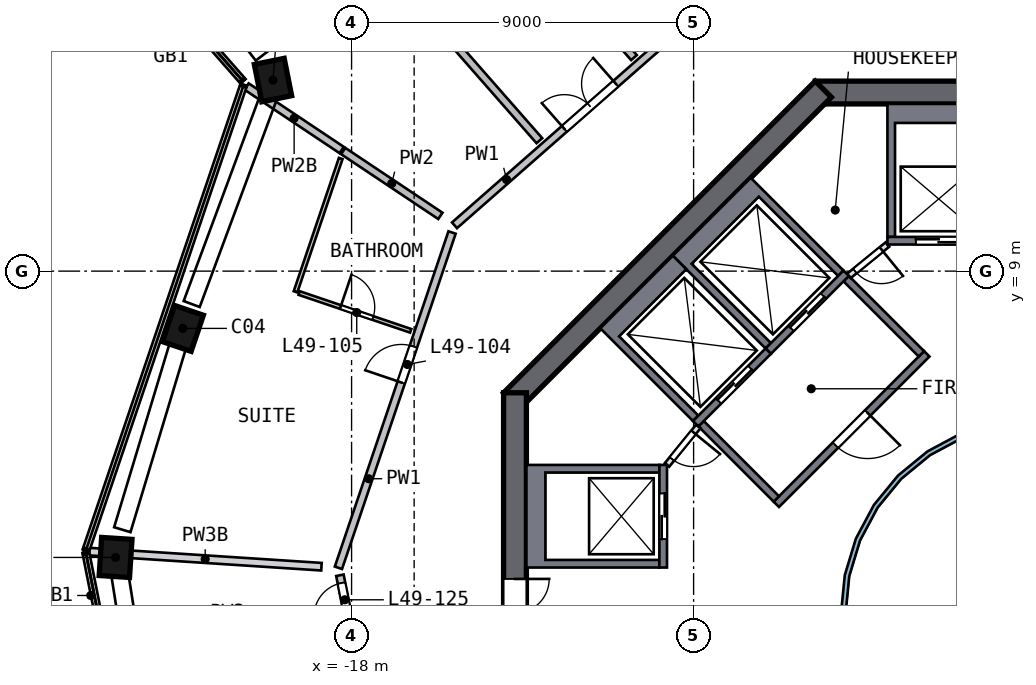
"""IFC4 building model, lengths in metres.
Left out: names, types, materials, properties, quantities, classifications, styles, units other than length and angle.
Written with IfcOpenShell. Run it as: python <this file> out.ifc"""

import sys

from ifc_helpers import new_model, si_unit, direction, frame, frame_2d, origin, origin_2d, place, context, subcontext, project, spatial, polyline, rectangle, outline, extrude, element, fill, save


model = new_model("IFC4")
c1 = context("Model", 3, precision=1e-05, world=origin(), true_north=direction((0.0, 1.0)))
c2 = subcontext(c1, "Body", "Model", "MODEL_VIEW")
j1 = project(units=[si_unit("LENGTHUNIT", "METRE"), si_unit("PLANEANGLEUNIT", "RADIAN")], contexts=[c1])
p1 = place(None, origin())
s1 = spatial("IfcSite", under=j1, at=p1, CompositionType="ELEMENT")
p2 = place(p1, origin())
s2 = spatial("IfcBuilding", under=s1, at=p2, CompositionType="ELEMENT")
p3 = place(p2, frame((0.0, 0.0, 201.0)))
s3 = spatial("IfcBuildingStorey", under=s2, at=p3, CompositionType="ELEMENT", Elevation=201.0)
p4 = place(p3, frame((-20.006, 14.118, 0.0), z_axis=(-0.051702637, -0.07462356, 0.995870555), x_axis=(-0.19950791, 0.977874236, 0.062917184)))
e1 = element("IfcColumn", 1, at=p4, inside=s3, PredefinedType="COLUMN", context=c2, shape_type="SweptSolid", body=[
    extrude(rectangle(XDim=1.0, YDim=0.8, at=origin_2d()), origin(), (0.0, 0.0, 1.0), 4.207),
])
p5 = place(p3, frame((-22.407, 7.593, 0.0), z_axis=(-0.027454561, -0.083350423, 0.996142035), x_axis=(-0.319622961, -0.943472661, -0.0877525)))
e2 = element("IfcColumn", 2, at=p5, inside=s3, PredefinedType="COLUMN", context=c2, shape_type="SweptSolid", body=[
    extrude(rectangle(XDim=1.0, YDim=0.8, at=origin_2d()), origin(), (0.0, 0.0, 1.0), 4.206),
])
p6 = place(p3, frame((-24.204, 1.574, 0.0), z_axis=(-0.005106808, -0.089833403, 0.995943713), x_axis=(0.064922521, 0.993825699, 0.089975257)))
e3 = element("IfcColumn", 3, at=p6, inside=s3, PredefinedType="COLUMN", context=c2, shape_type="SweptSolid", body=[
    extrude(rectangle(XDim=1.0, YDim=0.8, at=origin_2d()), origin(), (0.0, 0.0, 1.0), 4.207),
])
p7 = place(p3, frame((5.799, 13.7, 0.0), z_axis=(0.0, 0.0, 1.0), x_axis=(-1.0, 0.0, 0.0)))
e4 = element("IfcWall", 4, at=p7, inside=s3, PredefinedType="SHEAR", context=c2, shape_type="SweptSolid", body=[
    extrude(rectangle(XDim=11.598, YDim=0.6, at=frame_2d((5.799, 0.0))), origin(), (0.0, 0.0, 1.0), 4.5),
])
p8 = place(p7, frame((4.899, 0.0, 0.0)))
e5 = element("IfcOpeningElement", 5, at=p8, cuts=e4, PredefinedType="OPENING", context=c2, shape_type="SweptSolid", body=[
    extrude(rectangle(XDim=1.8, YDim=2.1, at=frame_2d((0.9, 1.05))), frame((0.0, 0.31, 0.0), z_axis=(0.0, -1.0, 0.0), x_axis=(1.0, 0.0, 0.0)), (0.0, 0.0, 1.0), 0.62),
])
p9 = place(p3, frame((-5.587, 13.788, 0.0), z_axis=(0.0, 0.0, 1.0), x_axis=(-0.707106781, -0.707106781, 0.0)))
e6 = element("IfcWall", 6, at=p9, inside=s3, PredefinedType="SHEAR", context=c2, shape_type="SweptSolid", body=[
    extrude(rectangle(XDim=11.598, YDim=0.6, at=frame_2d((5.799, 0.0))), origin(), (0.0, 0.0, 1.0), 4.5),
])
p10 = place(p3, frame((-13.7, 5.799, 0.0), z_axis=(0.0, 0.0, 1.0), x_axis=(0.0, -1.0, 0.0)))
e7 = element("IfcWall", 7, at=p10, inside=s3, PredefinedType="SHEAR", context=c2, shape_type="SweptSolid", body=[
    extrude(rectangle(XDim=11.598, YDim=0.6, at=frame_2d((5.799, 0.0))), origin(), (0.0, 0.0, 1.0), 4.5),
])
p11 = place(p10, frame((4.899, 0.0, 0.0)))
e8 = element("IfcOpeningElement", 8, at=p11, cuts=e7, PredefinedType="OPENING", context=c2, shape_type="SweptSolid", body=[
    extrude(rectangle(XDim=1.8, YDim=2.1, at=frame_2d((0.9, 1.05))), frame((0.0, 0.31, 0.0), z_axis=(0.0, -1.0, 0.0), x_axis=(1.0, 0.0, 0.0)), (0.0, 0.0, 1.0), 0.62),
])
p12 = place(p3, origin())
e9 = element("IfcWall", 9, at=p12, inside=s3, PredefinedType="SOLIDWALL", context=c2, shape_type="SweptSolid", body=[
    extrude(outline(polyline([(-3.9, 13.4), (-1.2, 13.4), (-1.2, 9.9), (-1.4, 9.9), (-1.4, 12.9), (-3.7, 12.9), (-3.7, 9.9), (-3.9, 9.9), (-3.9, 13.4)])), origin(), (0.0, 0.0, 1.0), 4.19),
])
p13 = place(p3, frame((-1.2, 9.8, 0.0), z_axis=(0.0, 0.0, 1.0), x_axis=(-1.0, 0.0, 0.0)))
e10 = element("IfcWall", 10, at=p13, inside=s3, PredefinedType="SOLIDWALL", context=c2, shape_type="SweptSolid", body=[
    extrude(rectangle(XDim=2.7, YDim=0.2, at=frame_2d((1.35, 0.0))), origin(), (0.0, 0.0, 1.0), 4.19),
])
p14 = place(p13, frame((0.75, 0.0, 0.0)))
e11 = element("IfcOpeningElement", 11, at=p14, cuts=e10, PredefinedType="OPENING", context=c2, shape_type="SweptSolid", body=[
    extrude(rectangle(XDim=1.2, YDim=2.1, at=frame_2d((0.6, 1.05))), frame((0.0, 0.11, 0.0), z_axis=(0.0, -1.0, 0.0), x_axis=(1.0, 0.0, 0.0)), (0.0, 0.0, 1.0), 0.22),
])
p15 = place(p3, origin())
e12 = element("IfcWall", 12, at=p15, inside=s3, PredefinedType="SOLIDWALL", context=c2, shape_type="SweptSolid", body=[
    extrude(outline(polyline([(-13.4, 3.9), (-9.9, 3.9), (-9.9, 3.7), (-12.9, 3.7), (-12.9, 1.4), (-9.9, 1.4), (-9.9, 1.2), (-13.4, 1.2), (-13.4, 3.9)])), origin(), (0.0, 0.0, 1.0), 4.19),
])
p16 = place(p3, frame((-9.8, 1.2, 0.0), z_axis=(0.0, 0.0, 1.0), x_axis=(0.0, 1.0, 0.0)))
e13 = element("IfcWall", 13, at=p16, inside=s3, PredefinedType="SOLIDWALL", context=c2, shape_type="SweptSolid", body=[
    extrude(rectangle(XDim=2.7, YDim=0.2, at=frame_2d((1.35, 0.0))), origin(), (0.0, 0.0, 1.0), 4.19),
])
p17 = place(p16, frame((0.75, 0.0, 0.0)))
e14 = element("IfcOpeningElement", 14, at=p17, cuts=e13, PredefinedType="OPENING", context=c2, shape_type="SweptSolid", body=[
    extrude(rectangle(XDim=1.2, YDim=2.1, at=frame_2d((0.6, 1.05))), frame((0.0, 0.11, 0.0), z_axis=(0.0, -1.0, 0.0), x_axis=(1.0, 0.0, 0.0)), (0.0, 0.0, 1.0), 0.22),
])
p18 = place(p3, origin())
e15 = element("IfcWall", 15, at=p18, inside=s3, PredefinedType="SOLIDWALL", context=c2, shape_type="SweptSolid", body=[
    extrude(outline(polyline([(-9.546, 9.405), (-7.495, 11.455), (-5.056, 9.016), (-5.197, 8.874), (-7.283, 10.96), (-9.051, 9.192), (-6.965, 7.106), (-7.106, 6.965), (-9.546, 9.405)])), origin(), (0.0, 0.0, 1.0), 4.19),
])
p19 = place(p3, frame((-4.985, 8.945, 0.0), z_axis=(0.0, 0.0, 1.0), x_axis=(-0.707106781, -0.707106781, 0.0)))
e16 = element("IfcWall", 16, at=p19, inside=s3, PredefinedType="SOLIDWALL", context=c2, shape_type="SweptSolid", body=[
    extrude(rectangle(XDim=2.9, YDim=0.2, at=frame_2d((1.45, 0.0))), origin(), (0.0, 0.0, 1.0), 4.19),
])
p20 = place(p19, frame((0.85, 0.0, 0.0)))
e17 = element("IfcOpeningElement", 17, at=p20, cuts=e16, PredefinedType="OPENING", context=c2, shape_type="SweptSolid", body=[
    extrude(rectangle(XDim=1.2, YDim=2.1, at=frame_2d((0.6, 1.05))), frame((0.0, 0.11, 0.0), z_axis=(0.0, -1.0, 0.0), x_axis=(1.0, 0.0, 0.0)), (0.0, 0.0, 1.0), 0.22),
])
p21 = place(p3, origin())
e18 = element("IfcWall", 18, at=p21, inside=s3, PredefinedType="SOLIDWALL", context=c2, shape_type="SweptSolid", body=[
    extrude(outline(polyline([(-11.455, 7.495), (-9.546, 9.405), (-9.192, 9.051), (-10.96, 7.283), (-8.874, 5.197), (-9.016, 5.056), (-11.455, 7.495)])), origin(), (0.0, 0.0, 1.0), 4.19),
])
p22 = place(p3, frame((-7.036, 6.894, 0.0), z_axis=(0.0, 0.0, 1.0), x_axis=(-0.707106781, -0.707106781, 0.0)))
e19 = element("IfcWall", 19, at=p22, inside=s3, PredefinedType="SOLIDWALL", context=c2, shape_type="SweptSolid", body=[
    extrude(rectangle(XDim=2.7, YDim=0.2, at=frame_2d((1.35, 0.0))), origin(), (0.0, 0.0, 1.0), 4.19),
])
p23 = place(p22, frame((0.65, 0.0, 0.0)))
e20 = element("IfcOpeningElement", 20, at=p23, cuts=e19, PredefinedType="OPENING", context=c2, shape_type="SweptSolid", body=[
    extrude(rectangle(XDim=1.2, YDim=2.1, at=frame_2d((0.6, 1.05))), frame((0.0, 0.11, 0.0), z_axis=(0.0, -1.0, 0.0), x_axis=(1.0, 0.0, 0.0)), (0.0, 0.0, 1.0), 0.22),
])
p24 = place(p3, frame((-2.864, 6.823, 0.0), z_axis=(0.0, 0.0, 1.0), x_axis=(-0.707106781, -0.707106781, 0.0)))
e21 = element("IfcWall", 21, at=p24, inside=s3, PredefinedType="SOLIDWALL", context=c2, shape_type="SweptSolid", body=[
    extrude(rectangle(XDim=5.6, YDim=0.2, at=frame_2d((2.8, 0.0))), origin(), (0.0, 0.0, 1.0), 4.19),
])
p25 = place(p24, frame((2.2, 0.0, 0.0)))
e22 = element("IfcOpeningElement", 22, at=p25, cuts=e21, PredefinedType="OPENING", context=c2, shape_type="SweptSolid", body=[
    extrude(rectangle(XDim=1.2, YDim=2.1, at=frame_2d((0.6, 1.05))), frame((0.0, 0.11, 0.0), z_axis=(0.0, -1.0, 0.0), x_axis=(1.0, 0.0, 0.0)), (0.0, 0.0, 1.0), 0.22),
])
for number, where, z_axis, x_axis in (
    (23, (-3.005, 6.823, 0.0), (0.0, 0.0, 1.0), (-0.707, 0.707, 0.0)),
    (24, (-6.823, 3.005, 0.0), (0.0, 0.0, 1.0), (-0.707, 0.707, 0.0)),
):
    element("IfcWall", number, at=place(p3, frame(where, z_axis=z_axis, x_axis=x_axis)), inside=s3, PredefinedType="SOLIDWALL", context=c2, shape_type="SweptSolid", body=[
        extrude(rectangle(XDim=2.8, YDim=0.2, at=frame_2d((1.4, 0.0))), origin(), (0.0, 0.0, 1.0), 4.19),
    ])
p26 = place(p3, frame((-3.9, 9.7, 0.0), z_axis=(0.0, 0.0, 1.0), x_axis=(-0.775559878, -0.631274009, 0.0)))
e25 = element("IfcWall", 25, at=p26, inside=s3, PredefinedType="PARTITIONING", context=c2, shape_type="SweptSolid", body=[
    extrude(rectangle(XDim=1.308, YDim=0.15, at=frame_2d((0.654, 0.0))), origin(), (0.0, 0.0, 1.0), 4.19),
])
p27 = place(p26, frame((0.204, 0.0, 0.0)))
e26 = element("IfcOpeningElement", 26, at=p27, cuts=e25, PredefinedType="OPENING", context=c2, shape_type="SweptSolid", body=[
    extrude(rectangle(XDim=0.9, YDim=2.1, at=frame_2d((0.45, 1.05))), frame((0.0, 0.085, 0.0), z_axis=(0.0, -1.0, 0.0), x_axis=(1.0, 0.0, 0.0)), (0.0, 0.0, 1.0), 0.17),
])
p28 = place(p3, frame((-8.874, 4.914, 0.0), z_axis=(0.0, 0.0, 1.0), x_axis=(-0.631274009, -0.775559878, 0.0)))
e27 = element("IfcWall", 27, at=p28, inside=s3, PredefinedType="PARTITIONING", context=c2, shape_type="SweptSolid", body=[
    extrude(rectangle(XDim=1.308, YDim=0.15, at=frame_2d((0.654, 0.0))), origin(), (0.0, 0.0, 1.0), 4.19),
])
p29 = place(p28, frame((0.204, 0.0, 0.0)))
e28 = element("IfcOpeningElement", 28, at=p29, cuts=e27, PredefinedType="OPENING", context=c2, shape_type="SweptSolid", body=[
    extrude(rectangle(XDim=0.9, YDim=2.1, at=frame_2d((0.45, 1.05))), frame((0.0, 0.085, 0.0), z_axis=(0.0, -1.0, 0.0), x_axis=(1.0, 0.0, 0.0)), (0.0, 0.0, 1.0), 0.17),
])
p30 = place(p3, origin())
e29 = element("IfcWall", 29, at=p30, inside=s3, PredefinedType="SOLIDWALL", context=c2, shape_type="SweptSolid", body=[
    extrude(outline(polyline([(5.021, -0.999), (4.73, -1.959), (4.257, -2.844), (3.62, -3.62), (2.844, -4.257), (1.959, -4.73), (0.999, -5.021), (0.0, -5.12), (-0.999, -5.021), (-1.959, -4.73), (-2.844, -4.257), (-3.62, -3.62), (-4.257, -2.844), (-4.73, -1.959), (-5.021, -0.999), (-5.12, 0.0), (-5.021, 0.999), (-4.73, 1.959), (-4.257, 2.844), (-3.62, 3.62), (-2.844, 4.257), (-1.959, 4.73), (-0.999, 5.021), (0.0, 5.12), (0.999, 5.021), (1.959, 4.73), (2.844, 4.257), (3.62, 3.62), (4.257, 2.844), (4.73, 1.959), (5.021, 0.999), (5.12, 0.0), (5.021, -0.999)]), holes=[polyline([(4.904, 0.976), (4.619, 1.913), (4.157, 2.778), (3.535, 3.535), (2.778, 4.157), (1.913, 4.619), (0.976, 4.904), (0.0, 5.0), (-0.976, 4.904), (-1.913, 4.619), (-2.778, 4.157), (-3.535, 3.535), (-4.157, 2.778), (-4.619, 1.913), (-4.904, 0.976), (-5.0, 0.0), (-4.904, -0.976), (-4.619, -1.913), (-4.157, -2.778), (-3.535, -3.535), (-2.778, -4.157), (-1.913, -4.619), (-0.976, -4.904), (0.0, -5.0), (0.976, -4.904), (1.913, -4.619), (2.778, -4.157), (3.535, -3.535), (4.157, -2.778), (4.619, -1.913), (4.904, -0.976), (5.0, 0.0), (4.904, 0.976)])]), origin(), (0.0, 0.0, 1.0), 4.19),
])
p31 = place(p3, frame((-16.524, -7.943, 0.0), z_axis=(0.0, 0.0, 1.0), x_axis=(-0.195611383, 0.980681491, 0.0)))
e30 = element("IfcWall", 30, at=p31, inside=s3, PredefinedType="SOLIDWALL", context=c2, shape_type="SweptSolid", body=[
    extrude(rectangle(XDim=9.116, YDim=0.2, at=frame_2d((4.558, 0.0))), origin(), (0.0, 0.0, 1.0), 4.19),
])
p32 = place(p31, frame((0.2, 0.0, 0.0)))
e31 = element("IfcOpeningElement", 31, at=p32, cuts=e30, PredefinedType="OPENING", context=c2, shape_type="SweptSolid", body=[
    extrude(rectangle(XDim=1.0, YDim=2.1, at=frame_2d((0.5, 1.05))), frame((0.0, 0.11, 0.0), z_axis=(0.0, -1.0, 0.0), x_axis=(1.0, 0.0, 0.0)), (0.0, 0.0, 1.0), 0.22),
])
p33 = place(p31, frame((8.008, 0.0, 0.0)))
e32 = element("IfcOpeningElement", 32, at=p33, cuts=e30, PredefinedType="OPENING", context=c2, shape_type="SweptSolid", body=[
    extrude(rectangle(XDim=0.9, YDim=2.1, at=frame_2d((0.45, 1.05))), frame((0.0, 0.11, 0.0), z_axis=(0.0, -1.0, 0.0), x_axis=(1.0, 0.0, 0.0)), (0.0, 0.0, 1.0), 0.22),
])
p34 = place(p31, frame((5.758, 0.0, 0.0)))
e33 = element("IfcOpeningElement", 33, at=p34, cuts=e30, PredefinedType="OPENING", context=c2, shape_type="SweptSolid", body=[
    extrude(rectangle(XDim=0.9, YDim=2.1, at=frame_2d((0.45, 1.05))), frame((0.0, 0.11, 0.0), z_axis=(0.0, -1.0, 0.0), x_axis=(1.0, 0.0, 0.0)), (0.0, 0.0, 1.0), 0.22),
])
p35 = place(p3, frame((-18.346, 1.193, 0.0), z_axis=(0.0, 0.0, 1.0), x_axis=(0.320932913, 0.94710193, 0.0)))
e34 = element("IfcWall", 34, at=p35, inside=s3, PredefinedType="SOLIDWALL", context=c2, shape_type="SweptSolid", body=[
    extrude(rectangle(XDim=9.317, YDim=0.2, at=frame_2d((4.658, 0.0))), origin(), (0.0, 0.0, 1.0), 4.19),
])
p36 = place(p35, frame((5.15, 0.0, 0.0)))
e35 = element("IfcOpeningElement", 35, at=p36, cuts=e34, PredefinedType="OPENING", context=c2, shape_type="SweptSolid", body=[
    extrude(rectangle(XDim=1.0, YDim=2.1, at=frame_2d((0.5, 1.05))), frame((0.0, 0.11, 0.0), z_axis=(0.0, -1.0, 0.0), x_axis=(1.0, 0.0, 0.0)), (0.0, 0.0, 1.0), 0.22),
])
p37 = place(p3, frame((-15.292, 10.206, 0.0), z_axis=(0.0, 0.0, 1.0), x_axis=(0.751501064, 0.659731878, 0.0)))
e36 = element("IfcWall", 36, at=p37, inside=s3, PredefinedType="SOLIDWALL", context=c2, shape_type="SweptSolid", body=[
    extrude(rectangle(XDim=9.317, YDim=0.2, at=frame_2d((4.658, 0.0))), origin(), (0.0, 0.0, 1.0), 4.19),
])
p38 = place(p37, frame((3.847, 0.0, 0.0)))
e37 = element("IfcOpeningElement", 37, at=p38, cuts=e36, PredefinedType="OPENING", context=c2, shape_type="SweptSolid", body=[
    extrude(rectangle(XDim=1.8, YDim=2.1, at=frame_2d((0.9, 1.05))), frame((0.0, 0.11, 0.0), z_axis=(0.0, -1.0, 0.0), x_axis=(1.0, 0.0, 0.0)), (0.0, 0.0, 1.0), 0.22),
])
p39 = place(p3, frame((-18.259, 12.187, 0.0), z_axis=(0.0, 0.0, 1.0), x_axis=(-0.83178828, 0.555093017, 0.0)))
e38 = element("IfcWall", 38, at=p39, inside=s3, PredefinedType="SOLIDWALL", context=c2, shape_type="SweptSolid", body=[
    extrude(rectangle(XDim=3.011, YDim=0.2, at=frame_2d((1.506, 0.0))), origin(), (0.0, 0.0, 1.0), 3.69),
])
p40 = place(p3, frame((-13.059, 12.433, 0.0), z_axis=(0.0, 0.0, 1.0), x_axis=(-0.659735881, 0.75149755, 0.0)))
e39 = element("IfcWall", 39, at=p40, inside=s3, PredefinedType="SOLIDWALL", context=c2, shape_type="SweptSolid", body=[
    extrude(rectangle(XDim=15.038, YDim=0.2, at=frame_2d((7.519, 0.0))), origin(), (0.0, 0.0, 1.0), 4.19),
])
p41 = place(p40, frame((4.7, 0.0, 0.0)))
e40 = element("IfcOpeningElement", 40, at=p41, cuts=e39, PredefinedType="OPENING", context=c2, shape_type="SweptSolid", body=[
    extrude(rectangle(XDim=1.0, YDim=2.1, at=frame_2d((0.5, 1.05))), frame((0.0, 0.11, 0.0), z_axis=(0.0, -1.0, 0.0), x_axis=(1.0, 0.0, 0.0)), (0.0, 0.0, 1.0), 0.22),
])
p42 = place(p3, frame((-15.664, 10.454, 0.0), z_axis=(0.0, 0.0, 1.0), x_axis=(-0.831769215, 0.555121583, 0.0)))
e41 = element("IfcWall", 41, at=p42, inside=s3, PredefinedType="SOLIDWALL", context=c2, shape_type="SweptSolid", body=[
    extrude(rectangle(XDim=3.075, YDim=0.2, at=frame_2d((1.537, 0.0))), origin(), (0.0, 0.0, 1.0), 4.19),
])
p43 = place(p3, frame((-20.489, 25.919, 0.0), z_axis=(0.0, 0.0, 1.0), x_axis=(0.659726712, -0.751505599, 0.0)))
e42 = element("IfcWall", 42, at=p43, inside=s3, PredefinedType="SOLIDWALL", context=c2, shape_type="SweptSolid", body=[
    extrude(rectangle(XDim=15.038, YDim=0.2, at=frame_2d((7.519, 0.0))), origin(), (0.0, 0.0, 1.0), 4.19),
])
p44 = place(p43, frame((4.75, 0.0, 0.0)))
e43 = element("IfcOpeningElement", 43, at=p44, cuts=e42, PredefinedType="OPENING", context=c2, shape_type="SweptSolid", body=[
    extrude(rectangle(XDim=1.0, YDim=2.1, at=frame_2d((0.5, 1.05))), frame((0.0, 0.11, 0.0), z_axis=(0.0, -1.0, 0.0), x_axis=(1.0, 0.0, 0.0)), (0.0, 0.0, 1.0), 0.22),
])
p45 = place(p3, frame((-19.475, 8.456, 0.0), z_axis=(0.0, 0.0, 1.0), x_axis=(0.320910025, 0.947109685, 0.0)))
e44 = element("IfcWall", 44, at=p45, inside=s3, PredefinedType="PARTITIONING", context=c2, shape_type="SweptSolid", body=[
    extrude(rectangle(XDim=3.704, YDim=0.1, at=frame_2d((1.852, 0.0))), origin(), (0.0, 0.0, 1.0), 4.19),
])
p46 = place(p3, frame((-19.38, 8.424, 0.0), z_axis=(0.0, 0.0, 1.0), x_axis=(0.947096316, -0.320949479, 0.0)))
e45 = element("IfcWall", 45, at=p46, inside=s3, PredefinedType="PARTITIONING", context=c2, shape_type="SweptSolid", body=[
    extrude(rectangle(XDim=3.1, YDim=0.1, at=frame_2d((1.55, 0.0))), origin(), (0.0, 0.0, 1.0), 4.19),
])
p47 = place(p46, frame((1.15, 0.0, 0.0)))
e46 = element("IfcOpeningElement", 46, at=p47, cuts=e45, PredefinedType="OPENING", context=c2, shape_type="SweptSolid", body=[
    extrude(rectangle(XDim=0.9, YDim=2.1, at=frame_2d((0.45, 1.05))), frame((0.0, 0.06, 0.0), z_axis=(0.0, -1.0, 0.0), x_axis=(1.0, 0.0, 0.0)), (0.0, 0.0, 1.0), 0.12),
])
p48 = place(p3, frame((-24.912, 1.62, 0.0), z_axis=(0.0, 0.0, 1.0), x_axis=(0.997892173, -0.064893846, 0.0)))
e47 = element("IfcWall", 47, at=p48, inside=s3, PredefinedType="SOLIDWALL", context=c2, shape_type="SweptSolid", body=[
    extrude(rectangle(XDim=6.132, YDim=0.2, at=frame_2d((3.066, 0.0))), origin(), (0.0, 0.0, 1.0), 3.69),
])
p49 = place(p14, origin())
e48 = element("IfcDoor", 48, at=p49, inside=s3, OperationType="DOUBLE_DOOR_SLIDING", PredefinedType="DOOR", context=c2, shape_type="SweptSolid", body=[
    extrude(rectangle(XDim=1.2, YDim=2.1, at=frame_2d((0.6, 1.05))), frame((0.0, 0.025, 0.0), z_axis=(0.0, -1.0, 0.0), x_axis=(1.0, 0.0, 0.0)), (0.0, 0.0, 1.0), 0.05),
])
fill(e11, e48)
p50 = place(p17, origin())
e49 = element("IfcDoor", 49, at=p50, inside=s3, OperationType="DOUBLE_DOOR_SLIDING", PredefinedType="DOOR", context=c2, shape_type="SweptSolid", body=[
    extrude(rectangle(XDim=1.2, YDim=2.1, at=frame_2d((0.6, 1.05))), frame((0.0, 0.025, 0.0), z_axis=(0.0, -1.0, 0.0), x_axis=(1.0, 0.0, 0.0)), (0.0, 0.0, 1.0), 0.05),
])
fill(e14, e49)
p51 = place(p20, origin())
e50 = element("IfcDoor", 50, at=p51, inside=s3, OperationType="DOUBLE_DOOR_SLIDING", PredefinedType="DOOR", context=c2, shape_type="SweptSolid", body=[
    extrude(rectangle(XDim=1.2, YDim=2.1, at=frame_2d((0.6, 1.05))), frame((0.0, 0.025, 0.0), z_axis=(0.0, -1.0, 0.0), x_axis=(1.0, 0.0, 0.0)), (0.0, 0.0, 1.0), 0.05),
])
fill(e17, e50)
p52 = place(p23, origin())
e51 = element("IfcDoor", 51, at=p52, inside=s3, OperationType="DOUBLE_DOOR_SLIDING", PredefinedType="DOOR", context=c2, shape_type="SweptSolid", body=[
    extrude(rectangle(XDim=1.2, YDim=2.1, at=frame_2d((0.6, 1.05))), frame((0.0, 0.025, 0.0), z_axis=(0.0, -1.0, 0.0), x_axis=(1.0, 0.0, 0.0)), (0.0, 0.0, 1.0), 0.05),
])
fill(e20, e51)
p53 = place(p11, origin())
e52 = element("IfcDoor", 52, at=p53, inside=s3, OperationType="DOUBLE_DOOR_SINGLE_SWING", PredefinedType="DOOR", context=c2, shape_type="SweptSolid", body=[
    extrude(rectangle(XDim=1.8, YDim=2.1, at=frame_2d((0.9, 1.05))), frame((0.0, 0.025, 0.0), z_axis=(0.0, -1.0, 0.0), x_axis=(1.0, 0.0, 0.0)), (0.0, 0.0, 1.0), 0.05),
])
fill(e8, e52)
p54 = place(p25, origin())
e53 = element("IfcDoor", 53, at=p54, inside=s3, OperationType="SINGLE_SWING_LEFT", PredefinedType="DOOR", context=c2, shape_type="SweptSolid", body=[
    extrude(rectangle(XDim=1.2, YDim=2.1, at=frame_2d((0.6, 1.05))), frame((0.0, 0.025, 0.0), z_axis=(0.0, -1.0, 0.0), x_axis=(1.0, 0.0, 0.0)), (0.0, 0.0, 1.0), 0.05),
])
fill(e22, e53)
p55 = place(p27, origin())
e54 = element("IfcDoor", 54, at=p55, inside=s3, OperationType="SINGLE_SWING_LEFT", PredefinedType="DOOR", context=c2, shape_type="SweptSolid", body=[
    extrude(rectangle(XDim=0.9, YDim=2.1, at=frame_2d((0.45, 1.05))), frame((0.0, 0.025, 0.0), z_axis=(0.0, -1.0, 0.0), x_axis=(1.0, 0.0, 0.0)), (0.0, 0.0, 1.0), 0.05),
])
fill(e26, e54)
p56 = place(p29, origin())
e55 = element("IfcDoor", 55, at=p56, inside=s3, OperationType="SINGLE_SWING_LEFT", PredefinedType="DOOR", context=c2, shape_type="SweptSolid", body=[
    extrude(rectangle(XDim=0.9, YDim=2.1, at=frame_2d((0.45, 1.05))), frame((0.0, 0.025, 0.0), z_axis=(0.0, -1.0, 0.0), x_axis=(1.0, 0.0, 0.0)), (0.0, 0.0, 1.0), 0.05),
])
fill(e28, e55)
p57 = place(p38, origin())
e56 = element("IfcDoor", 56, at=p57, inside=s3, OperationType="DOUBLE_DOOR_SINGLE_SWING", PredefinedType="DOOR", context=c2, shape_type="SweptSolid", body=[
    extrude(rectangle(XDim=1.8, YDim=2.1, at=frame_2d((0.9, 1.05))), frame((0.0, 0.025, 0.0), z_axis=(0.0, -1.0, 0.0), x_axis=(1.0, 0.0, 0.0)), (0.0, 0.0, 1.0), 0.05),
])
fill(e37, e56)
p58 = place(p36, origin())
e57 = element("IfcDoor", 57, at=p58, inside=s3, OperationType="SINGLE_SWING_LEFT", PredefinedType="DOOR", context=c2, shape_type="SweptSolid", body=[
    extrude(rectangle(XDim=1.0, YDim=2.1, at=frame_2d((0.5, 1.05))), frame((0.0, 0.025, 0.0), z_axis=(0.0, -1.0, 0.0), x_axis=(1.0, 0.0, 0.0)), (0.0, 0.0, 1.0), 0.05),
])
fill(e35, e57)
p59 = place(p47, origin())
e58 = element("IfcDoor", 58, at=p59, inside=s3, OperationType="SINGLE_SWING_LEFT", PredefinedType="DOOR", context=c2, shape_type="SweptSolid", body=[
    extrude(rectangle(XDim=0.9, YDim=2.1, at=frame_2d((0.45, 1.05))), frame((0.0, 0.025, 0.0), z_axis=(0.0, -1.0, 0.0), x_axis=(1.0, 0.0, 0.0)), (0.0, 0.0, 1.0), 0.05),
])
fill(e46, e58)
p60 = place(p33, origin())
e59 = element("IfcDoor", 59, at=p60, inside=s3, OperationType="SINGLE_SWING_LEFT", PredefinedType="DOOR", context=c2, shape_type="SweptSolid", body=[
    extrude(rectangle(XDim=0.9, YDim=2.1, at=frame_2d((0.45, 1.05))), frame((0.0, 0.025, 0.0), z_axis=(0.0, -1.0, 0.0), x_axis=(1.0, 0.0, 0.0)), (0.0, 0.0, 1.0), 0.05),
])
fill(e32, e59)
save(model, sys.argv[1])
